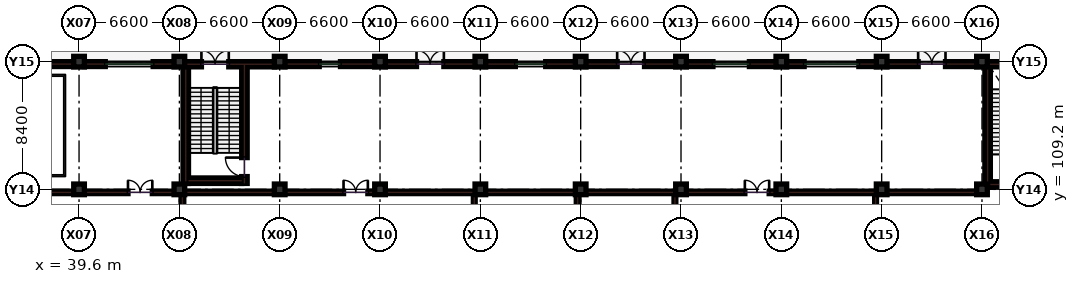
"""IFC4 building model, lengths in metres.
Left out: names, types, materials, properties, quantities, classifications, styles, units other than length and angle.
Written with IfcOpenShell. Run it as: python <this file> out.ifc"""

import sys

from ifc_helpers import new_model, si_unit, direction, frame, frame_2d, origin, origin_2d, place, context, subcontext, project, spatial, rectangle, extrude, element, fill, save


model = new_model("IFC4")
c1 = context("Model", 3, precision=1e-05, world=origin(), true_north=direction((0.0, 1.0)))
c2 = subcontext(c1, "Body", "Model", "MODEL_VIEW")
j1 = project(units=[si_unit("LENGTHUNIT", "METRE"), si_unit("PLANEANGLEUNIT", "RADIAN")], contexts=[c1])
p1 = place(None, origin())
s1 = spatial("IfcSite", under=j1, at=p1, CompositionType="ELEMENT")
p2 = place(p1, origin())
s2 = spatial("IfcBuilding", under=s1, at=p2, CompositionType="ELEMENT")
p3 = place(p2, origin())
s3 = spatial("IfcBuildingStorey", under=s2, at=p3, CompositionType="ELEMENT", Elevation=0.0)
for number, where, z_axis, x_axis in (
    (1, (39.6, 109.2, 0.0), (0.0, 0.0, 1.0), (1.0, 0.0, 0.0)),
    (2, (39.6, 117.6, 0.0), (0.0, 0.0, 1.0), (1.0, 0.0, 0.0)),
    (3, (46.2, 109.2, 0.0), (0.0, 0.0, 1.0), (1.0, 0.0, 0.0)),
    (4, (46.2, 117.6, 0.0), (0.0, 0.0, 1.0), (1.0, 0.0, 0.0)),
    (5, (52.8, 109.2, 0.0), (0.0, 0.0, 1.0), (1.0, 0.0, 0.0)),
    (6, (52.8, 117.6, 0.0), (0.0, 0.0, 1.0), (1.0, 0.0, 0.0)),
    (7, (59.4, 109.2, 0.0), (0.0, 0.0, 1.0), (1.0, 0.0, 0.0)),
    (8, (59.4, 117.6, 0.0), (0.0, 0.0, 1.0), (1.0, 0.0, 0.0)),
    (9, (66.0, 109.2, 0.0), (0.0, 0.0, 1.0), (1.0, 0.0, 0.0)),
    (10, (66.0, 117.6, 0.0), (0.0, 0.0, 1.0), (1.0, 0.0, 0.0)),
    (11, (72.6, 109.2, 0.0), (0.0, 0.0, 1.0), (1.0, 0.0, 0.0)),
    (12, (72.6, 117.6, 0.0), (0.0, 0.0, 1.0), (1.0, 0.0, 0.0)),
    (13, (79.2, 109.2, 0.0), (0.0, 0.0, 1.0), (1.0, 0.0, 0.0)),
    (14, (79.2, 117.6, 0.0), (0.0, 0.0, 1.0), (1.0, 0.0, 0.0)),
    (15, (85.8, 109.2, 0.0), (0.0, 0.0, 1.0), (1.0, 0.0, 0.0)),
    (16, (85.8, 117.6, 0.0), (0.0, 0.0, 1.0), (1.0, 0.0, 0.0)),
    (17, (92.4, 109.2, 0.0), (0.0, 0.0, 1.0), (1.0, 0.0, 0.0)),
    (18, (92.4, 117.6, 0.0), (0.0, 0.0, 1.0), (1.0, 0.0, 0.0)),
    (19, (99.0, 109.2, 0.0), (0.0, 0.0, 1.0), (1.0, 0.0, 0.0)),
    (20, (99.0, 117.6, 0.0), (0.0, 0.0, 1.0), (1.0, 0.0, 0.0)),
):
    element("IfcColumn", number, at=place(p3, frame(where, z_axis=z_axis, x_axis=x_axis)), inside=s3, PredefinedType="COLUMN", context=c2, shape_type="SweptSolid", body=[
        extrude(rectangle(XDim=0.7, YDim=0.7, at=origin_2d()), origin(), (0.0, 0.0, 1.0), 5.4),
    ])
p4 = place(p3, frame((33.32, 109.0, 0.0), z_axis=(0.0, 0.0, 1.0), x_axis=(1.0, 0.0, 0.0)))
e21 = element("IfcWall", 21, at=p4, inside=s3, PredefinedType="PARTITIONING", context=c2, shape_type="SweptSolid", body=[
    extrude(rectangle(XDim=5.83, YDim=0.16, at=frame_2d((2.915, 0.0))), origin(), (0.0, 0.0, 1.0), 4.235),
])
p5 = place(p3, frame((40.05, 109.0, 0.0), z_axis=(0.0, 0.0, 1.0), x_axis=(1.0, 0.0, 0.0)))
e22 = element("IfcWall", 22, at=p5, inside=s3, PredefinedType="PARTITIONING", context=c2, shape_type="SweptSolid", body=[
    extrude(rectangle(XDim=5.7, YDim=0.16, at=frame_2d((2.85, 0.0))), origin(), (0.0, 0.0, 1.0), 4.235),
])
p6 = place(p5, frame((2.77, 0.0, 0.0)))
e23 = element("IfcOpeningElement", 23, at=p6, cuts=e22, PredefinedType="OPENING", context=c2, shape_type="SweptSolid", body=[
    extrude(rectangle(XDim=1.6, YDim=2.2, at=frame_2d((0.8, 1.1))), frame((0.0, 0.09, 0.0), z_axis=(0.0, -1.0, 0.0), x_axis=(1.0, 0.0, 0.0)), (0.0, 0.0, 1.0), 0.18),
])
p7 = place(p3, frame((46.65, 109.0, 0.0), z_axis=(0.0, 0.0, 1.0), x_axis=(1.0, 0.0, 0.0)))
e24 = element("IfcWall", 24, at=p7, inside=s3, PredefinedType="PARTITIONING", context=c2, shape_type="SweptSolid", body=[
    extrude(rectangle(XDim=5.7, YDim=0.16, at=frame_2d((2.85, 0.0))), origin(), (0.0, 0.0, 1.0), 4.235),
])
p8 = place(p3, frame((53.25, 109.0, 0.0), z_axis=(0.0, 0.0, 1.0), x_axis=(1.0, 0.0, 0.0)))
e25 = element("IfcWall", 25, at=p8, inside=s3, PredefinedType="PARTITIONING", context=c2, shape_type="SweptSolid", body=[
    extrude(rectangle(XDim=5.7, YDim=0.16, at=frame_2d((2.85, 0.0))), origin(), (0.0, 0.0, 1.0), 4.235),
])
p9 = place(p8, frame((3.75, 0.0, 0.0)))
e26 = element("IfcOpeningElement", 26, at=p9, cuts=e25, PredefinedType="OPENING", context=c2, shape_type="SweptSolid", body=[
    extrude(rectangle(XDim=1.6, YDim=2.2, at=frame_2d((0.8, 1.1))), frame((0.0, 0.09, 0.0), z_axis=(0.0, -1.0, 0.0), x_axis=(1.0, 0.0, 0.0)), (0.0, 0.0, 1.0), 0.18),
])
for number, where, z_axis, x_axis in (
    (27, (59.85, 109.0, 0.0), (0.0, 0.0, 1.0), (1.0, 0.0, 0.0)),
    (28, (66.45, 109.0, 0.0), (0.0, 0.0, 1.0), (1.0, 0.0, 0.0)),
    (29, (73.05, 109.0, 0.0), (0.0, 0.0, 1.0), (1.0, 0.0, 0.0)),
):
    element("IfcWall", number, at=place(p3, frame(where, z_axis=z_axis, x_axis=x_axis)), inside=s3, PredefinedType="PARTITIONING", context=c2, shape_type="SweptSolid", body=[
        extrude(rectangle(XDim=5.7, YDim=0.16, at=frame_2d((2.85, 0.0))), origin(), (0.0, 0.0, 1.0), 4.235),
    ])
p10 = place(p3, frame((79.65, 109.0, 0.0), z_axis=(0.0, 0.0, 1.0), x_axis=(1.0, 0.0, 0.0)))
e30 = element("IfcWall", 30, at=p10, inside=s3, PredefinedType="PARTITIONING", context=c2, shape_type="SweptSolid", body=[
    extrude(rectangle(XDim=5.7, YDim=0.16, at=frame_2d((2.85, 0.0))), origin(), (0.0, 0.0, 1.0), 4.235),
])
p11 = place(p10, frame((3.75, 0.0, 0.0)))
e31 = element("IfcOpeningElement", 31, at=p11, cuts=e30, PredefinedType="OPENING", context=c2, shape_type="SweptSolid", body=[
    extrude(rectangle(XDim=1.6, YDim=2.2, at=frame_2d((0.8, 1.1))), frame((0.0, 0.09, 0.0), z_axis=(0.0, -1.0, 0.0), x_axis=(1.0, 0.0, 0.0)), (0.0, 0.0, 1.0), 0.18),
])
p12 = place(p3, frame((86.25, 109.0, 0.0), z_axis=(0.0, 0.0, 1.0), x_axis=(1.0, 0.0, 0.0)))
e32 = element("IfcWall", 32, at=p12, inside=s3, PredefinedType="PARTITIONING", context=c2, shape_type="SweptSolid", body=[
    extrude(rectangle(XDim=5.7, YDim=0.16, at=frame_2d((2.85, 0.0))), origin(), (0.0, 0.0, 1.0), 4.235),
])
p13 = place(p3, frame((92.85, 109.0, 0.0), z_axis=(0.0, 0.0, 1.0), x_axis=(1.0, 0.0, 0.0)))
e33 = element("IfcWall", 33, at=p13, inside=s3, PredefinedType="PARTITIONING", context=c2, shape_type="SweptSolid", body=[
    extrude(rectangle(XDim=6.45, YDim=0.16, at=frame_2d((3.225, 0.0))), origin(), (0.0, 0.0, 1.0), 4.235),
])
for number, where, z_axis, x_axis in (
    (34, (46.4, 101.25, 0.0), (0.0, 0.0, 1.0), (0.0, 1.0, 0.0)),
    (35, (72.4, 101.25, 0.0), (0.0, 0.0, 1.0), (0.0, 1.0, 0.0)),
):
    element("IfcWall", number, at=place(p3, frame(where, z_axis=z_axis, x_axis=x_axis)), inside=s3, PredefinedType="SOLIDWALL", context=c2, shape_type="SweptSolid", body=[
        extrude(rectangle(XDim=7.75, YDim=0.18, at=frame_2d((3.875, 0.0))), origin(), (0.0, 0.0, 1.0), 4.25),
    ])
p14 = place(p3, frame((65.6, 101.0, 0.0), z_axis=(0.0, 0.0, 1.0), x_axis=(0.0, 1.0, 0.0)))
e36 = element("IfcWall", 36, at=p14, inside=s3, PredefinedType="PARTITIONING", context=c2, shape_type="SweptSolid", body=[
    extrude(rectangle(XDim=8.0, YDim=0.12, at=frame_2d((4.0, 0.0))), origin(), (0.0, 0.0, 1.0), 4.25),
])
p15 = place(p14, frame((3.8, 0.0, 0.0)))
e37 = element("IfcOpeningElement", 37, at=p15, cuts=e36, PredefinedType="OPENING", context=c2, shape_type="SweptSolid", body=[
    extrude(rectangle(XDim=1.0, YDim=2.2, at=frame_2d((0.5, 1.1))), frame((0.0, 0.07, 0.0), z_axis=(0.0, -1.0, 0.0), x_axis=(1.0, 0.0, 0.0)), (0.0, 0.0, 1.0), 0.14),
])
p16 = place(p3, frame((78.8, 101.0, 0.0), z_axis=(0.0, 0.0, 1.0), x_axis=(0.0, 1.0, 0.0)))
e38 = element("IfcWall", 38, at=p16, inside=s3, PredefinedType="PARTITIONING", context=c2, shape_type="SweptSolid", body=[
    extrude(rectangle(XDim=8.0, YDim=0.12, at=frame_2d((4.0, 0.0))), origin(), (0.0, 0.0, 1.0), 4.25),
])
p17 = place(p16, frame((3.8, 0.0, 0.0)))
e39 = element("IfcOpeningElement", 39, at=p17, cuts=e38, PredefinedType="OPENING", context=c2, shape_type="SweptSolid", body=[
    extrude(rectangle(XDim=1.15, YDim=2.2, at=frame_2d((0.575, 1.1))), frame((0.0, 0.07, 0.0), z_axis=(0.0, -1.0, 0.0), x_axis=(1.0, 0.0, 0.0)), (0.0, 0.0, 1.0), 0.14),
])
p18 = place(p3, frame((92.0, 101.0, 0.0), z_axis=(0.0, 0.0, 1.0), x_axis=(0.0, 1.0, 0.0)))
e40 = element("IfcWall", 40, at=p18, inside=s3, PredefinedType="PARTITIONING", context=c2, shape_type="SweptSolid", body=[
    extrude(rectangle(XDim=8.0, YDim=0.12, at=frame_2d((4.0, 0.0))), origin(), (0.0, 0.0, 1.0), 4.25),
])
p19 = place(p18, frame((3.8, 0.0, 0.0)))
e41 = element("IfcOpeningElement", 41, at=p19, cuts=e40, PredefinedType="OPENING", context=c2, shape_type="SweptSolid", body=[
    extrude(rectangle(XDim=1.45, YDim=2.25, at=frame_2d((0.725, 1.125))), frame((0.0, 0.07, 0.0), z_axis=(0.0, -1.0, 0.0), x_axis=(1.0, 0.0, 0.0)), (0.0, 0.0, 1.0), 0.14),
])
p20 = place(p3, frame((39.255, 117.44, 0.0), z_axis=(0.0, 0.0, 1.0), x_axis=(-1.0, 0.0, 0.0)))
e42 = element("IfcWall", 42, at=p20, inside=s3, PredefinedType="SOLIDWALL", context=c2, shape_type="SweptSolid", body=[
    extrude(rectangle(XDim=5.96, YDim=0.32, at=frame_2d((2.98, 0.0))), origin(), (0.0, 0.0, 1.0), 4.385),
])
p21 = place(p20, frame((1.555, 0.0, 0.95)))
e43 = element("IfcOpeningElement", 43, at=p21, cuts=e42, PredefinedType="OPENING", context=c2, shape_type="SweptSolid", body=[
    extrude(rectangle(XDim=2.85, YDim=1.65, at=frame_2d((1.425, 0.825))), frame((0.0, 0.17, 0.0), z_axis=(0.0, -1.0, 0.0), x_axis=(1.0, 0.0, 0.0)), (0.0, 0.0, 1.0), 0.34),
])
p22 = place(p3, frame((45.855, 117.44, 0.0), z_axis=(0.0, 0.0, 1.0), x_axis=(-1.0, 0.0, 0.0)))
e44 = element("IfcWall", 44, at=p22, inside=s3, PredefinedType="SOLIDWALL", context=c2, shape_type="SweptSolid", body=[
    extrude(rectangle(XDim=5.91, YDim=0.32, at=frame_2d((2.955, 0.0))), origin(), (0.0, 0.0, 1.0), 4.385),
])
p23 = place(p22, frame((1.38, 0.0, 0.95)))
e45 = element("IfcOpeningElement", 45, at=p23, cuts=e44, PredefinedType="OPENING", context=c2, shape_type="SweptSolid", body=[
    extrude(rectangle(XDim=3.15, YDim=1.7, at=frame_2d((1.575, 0.85))), frame((0.0, 0.17, 0.0), z_axis=(0.0, -1.0, 0.0), x_axis=(1.0, 0.0, 0.0)), (0.0, 0.0, 1.0), 0.34),
])
p24 = place(p3, frame((52.455, 117.43, 0.0), z_axis=(0.0, 0.0, 1.0), x_axis=(-1.0, 0.0, 0.0)))
e46 = element("IfcWall", 46, at=p24, inside=s3, PredefinedType="SHEAR", context=c2, shape_type="SweptSolid", body=[
    extrude(rectangle(XDim=5.91, YDim=0.34, at=frame_2d((2.955, 0.0))), origin(), (0.0, 0.0, 1.0), 5.1),
])
p25 = place(p24, frame((3.005, 0.0, 0.0)))
e47 = element("IfcOpeningElement", 47, at=p25, cuts=e46, PredefinedType="OPENING", context=c2, shape_type="SweptSolid", body=[
    extrude(rectangle(XDim=1.8, YDim=2.2, at=frame_2d((0.9, 1.1))), frame((0.0, 0.18, 0.0), z_axis=(0.0, -1.0, 0.0), x_axis=(1.0, 0.0, 0.0)), (0.0, 0.0, 1.0), 0.36),
])
p26 = place(p3, frame((59.055, 117.44, 0.0), z_axis=(0.0, 0.0, 1.0), x_axis=(-1.0, 0.0, 0.0)))
e48 = element("IfcWall", 48, at=p26, inside=s3, PredefinedType="SOLIDWALL", context=c2, shape_type="SweptSolid", body=[
    extrude(rectangle(XDim=5.91, YDim=0.32, at=frame_2d((2.955, 0.0))), origin(), (0.0, 0.0, 1.0), 4.385),
])
p27 = place(p26, frame((2.255, 0.0, 0.95)))
e49 = element("IfcOpeningElement", 49, at=p27, cuts=e48, PredefinedType="OPENING", context=c2, shape_type="SweptSolid", body=[
    extrude(rectangle(XDim=1.4, YDim=1.95, at=frame_2d((0.7, 0.975))), frame((0.0, 0.17, 0.0), z_axis=(0.0, -1.0, 0.0), x_axis=(1.0, 0.0, 0.0)), (0.0, 0.0, 1.0), 0.34),
])
p28 = place(p3, frame((65.655, 117.44, 0.0), z_axis=(0.0, 0.0, 1.0), x_axis=(-1.0, 0.0, 0.0)))
e50 = element("IfcWall", 50, at=p28, inside=s3, PredefinedType="SOLIDWALL", context=c2, shape_type="SweptSolid", body=[
    extrude(rectangle(XDim=5.91, YDim=0.32, at=frame_2d((2.955, 0.0))), origin(), (0.0, 0.0, 1.0), 4.385),
])
p29 = place(p28, frame((2.055, 0.0, 0.0)))
e51 = element("IfcOpeningElement", 51, at=p29, cuts=e50, PredefinedType="OPENING", context=c2, shape_type="SweptSolid", body=[
    extrude(rectangle(XDim=1.8, YDim=2.2, at=frame_2d((0.9, 1.1))), frame((0.0, 0.17, 0.0), z_axis=(0.0, -1.0, 0.0), x_axis=(1.0, 0.0, 0.0)), (0.0, 0.0, 1.0), 0.34),
])
p30 = place(p3, frame((72.255, 117.44, 0.0), z_axis=(0.0, 0.0, 1.0), x_axis=(-1.0, 0.0, 0.0)))
e52 = element("IfcWall", 52, at=p30, inside=s3, PredefinedType="SOLIDWALL", context=c2, shape_type="SweptSolid", body=[
    extrude(rectangle(XDim=5.91, YDim=0.32, at=frame_2d((2.955, 0.0))), origin(), (0.0, 0.0, 1.0), 4.385),
])
p31 = place(p30, frame((1.955, 0.0, 0.95)))
e53 = element("IfcOpeningElement", 53, at=p31, cuts=e52, PredefinedType="OPENING", context=c2, shape_type="SweptSolid", body=[
    extrude(rectangle(XDim=2.0, YDim=1.95, at=frame_2d((1.0, 0.975))), frame((0.0, 0.17, 0.0), z_axis=(0.0, -1.0, 0.0), x_axis=(1.0, 0.0, 0.0)), (0.0, 0.0, 1.0), 0.34),
])
p32 = place(p3, frame((78.855, 117.44, 0.0), z_axis=(0.0, 0.0, 1.0), x_axis=(-1.0, 0.0, 0.0)))
e54 = element("IfcWall", 54, at=p32, inside=s3, PredefinedType="SOLIDWALL", context=c2, shape_type="SweptSolid", body=[
    extrude(rectangle(XDim=5.91, YDim=0.32, at=frame_2d((2.955, 0.0))), origin(), (0.0, 0.0, 1.0), 4.385),
])
p33 = place(p32, frame((2.055, 0.0, 0.0)))
e55 = element("IfcOpeningElement", 55, at=p33, cuts=e54, PredefinedType="OPENING", context=c2, shape_type="SweptSolid", body=[
    extrude(rectangle(XDim=1.8, YDim=2.2, at=frame_2d((0.9, 1.1))), frame((0.0, 0.17, 0.0), z_axis=(0.0, -1.0, 0.0), x_axis=(1.0, 0.0, 0.0)), (0.0, 0.0, 1.0), 0.34),
])
p34 = place(p3, frame((85.455, 117.44, 0.0), z_axis=(0.0, 0.0, 1.0), x_axis=(-1.0, 0.0, 0.0)))
e56 = element("IfcWall", 56, at=p34, inside=s3, PredefinedType="SOLIDWALL", context=c2, shape_type="SweptSolid", body=[
    extrude(rectangle(XDim=5.91, YDim=0.32, at=frame_2d((2.955, 0.0))), origin(), (0.0, 0.0, 1.0), 4.385),
])
p35 = place(p34, frame((1.755, 0.0, 0.95)))
e57 = element("IfcOpeningElement", 57, at=p35, cuts=e56, PredefinedType="OPENING", context=c2, shape_type="SweptSolid", body=[
    extrude(rectangle(XDim=2.4, YDim=1.6, at=frame_2d((1.2, 0.8))), frame((0.0, 0.17, 0.0), z_axis=(0.0, -1.0, 0.0), x_axis=(1.0, 0.0, 0.0)), (0.0, 0.0, 1.0), 0.34),
])
p36 = place(p3, frame((92.055, 117.44, 0.0), z_axis=(0.0, 0.0, 1.0), x_axis=(-1.0, 0.0, 0.0)))
e58 = element("IfcWall", 58, at=p36, inside=s3, PredefinedType="SOLIDWALL", context=c2, shape_type="SweptSolid", body=[
    extrude(rectangle(XDim=5.91, YDim=0.32, at=frame_2d((2.955, 0.0))), origin(), (0.0, 0.0, 1.0), 4.385),
])
p37 = place(p36, frame((1.155, 0.0, 0.95)))
e59 = element("IfcOpeningElement", 59, at=p37, cuts=e58, PredefinedType="OPENING", context=c2, shape_type="SweptSolid", body=[
    extrude(rectangle(XDim=3.6, YDim=2.0, at=frame_2d((1.8, 1.0))), frame((0.0, 0.17, 0.0), z_axis=(0.0, -1.0, 0.0), x_axis=(1.0, 0.0, 0.0)), (0.0, 0.0, 1.0), 0.34),
])
p38 = place(p3, frame((98.655, 117.44, 0.0), z_axis=(0.0, 0.0, 1.0), x_axis=(-1.0, 0.0, 0.0)))
e60 = element("IfcWall", 60, at=p38, inside=s3, PredefinedType="SOLIDWALL", context=c2, shape_type="SweptSolid", body=[
    extrude(rectangle(XDim=5.91, YDim=0.32, at=frame_2d((2.955, 0.0))), origin(), (0.0, 0.0, 1.0), 4.385),
])
p39 = place(p38, frame((2.055, 0.0, 0.0)))
e61 = element("IfcOpeningElement", 61, at=p39, cuts=e60, PredefinedType="OPENING", context=c2, shape_type="SweptSolid", body=[
    extrude(rectangle(XDim=1.8, YDim=2.2, at=frame_2d((0.9, 1.1))), frame((0.0, 0.17, 0.0), z_axis=(0.0, -1.0, 0.0), x_axis=(1.0, 0.0, 0.0)), (0.0, 0.0, 1.0), 0.34),
])
p40 = place(p3, frame((105.255, 117.43, 0.0), z_axis=(0.0, 0.0, 1.0), x_axis=(-1.0, 0.0, 0.0)))
e62 = element("IfcWall", 62, at=p40, inside=s3, PredefinedType="SHEAR", context=c2, shape_type="SweptSolid", body=[
    extrude(rectangle(XDim=5.91, YDim=0.34, at=frame_2d((2.955, 0.0))), origin(), (0.0, 0.0, 1.0), 5.1),
])
p41 = place(p3, frame((99.37, 109.34, 0.0), z_axis=(0.0, 0.0, 1.0), x_axis=(0.0, 1.0, 0.0)))
e63 = element("IfcWall", 63, at=p41, inside=s3, PredefinedType="SHEAR", context=c2, shape_type="SweptSolid", body=[
    extrude(rectangle(XDim=8.09, YDim=0.36, at=frame_2d((4.045, 0.0))), origin(), (0.0, 0.0, 1.0), 5.1),
])
p42 = place(p3, frame((99.55, 109.52, 0.0), z_axis=(0.0, 0.0, 1.0), x_axis=(1.0, 0.0, 0.0)))
e64 = element("IfcWall", 64, at=p42, inside=s3, PredefinedType="SHEAR", context=c2, shape_type="SweptSolid", body=[
    extrude(rectangle(XDim=3.8, YDim=0.36, at=frame_2d((1.9, 0.0))), origin(), (0.0, 0.0, 1.0), 5.1),
])
p43 = place(p3, frame((46.62, 109.59, 0.0), z_axis=(0.0, 0.0, 1.0), x_axis=(0.0, 1.0, 0.0)))
e65 = element("IfcWall", 65, at=p43, inside=s3, PredefinedType="SHEAR", context=c2, shape_type="SweptSolid", body=[
    extrude(rectangle(XDim=7.84, YDim=0.36, at=frame_2d((3.92, 0.0))), origin(), (0.0, 0.0, 1.0), 5.1),
])
p44 = place(p3, frame((50.48, 109.59, 0.0), z_axis=(0.0, 0.0, 1.0), x_axis=(0.0, 1.0, 0.0)))
e66 = element("IfcWall", 66, at=p44, inside=s3, PredefinedType="SHEAR", context=c2, shape_type="SweptSolid", body=[
    extrude(rectangle(XDim=7.84, YDim=0.36, at=frame_2d((3.92, 0.0))), origin(), (0.0, 0.0, 1.0), 5.1),
])
p45 = place(p44, frame((0.45, 0.0, 0.0)))
e67 = element("IfcOpeningElement", 67, at=p45, cuts=e66, PredefinedType="OPENING", context=c2, shape_type="SweptSolid", body=[
    extrude(rectangle(XDim=1.25, YDim=2.15, at=frame_2d((0.625, 1.075))), frame((0.0, 0.19, 0.0), z_axis=(0.0, -1.0, 0.0), x_axis=(1.0, 0.0, 0.0)), (0.0, 0.0, 1.0), 0.38),
])
p46 = place(p3, frame((46.8, 109.77, 0.0), z_axis=(0.0, 0.0, 1.0), x_axis=(1.0, 0.0, 0.0)))
e68 = element("IfcWall", 68, at=p46, inside=s3, PredefinedType="SHEAR", context=c2, shape_type="SweptSolid", body=[
    extrude(rectangle(XDim=3.5, YDim=0.36, at=frame_2d((1.75, 0.0))), origin(), (0.0, 0.0, 1.0), 5.1),
])
p47 = place(p6, origin())
e69 = element("IfcDoor", 69, at=p47, inside=s3, OperationType="DOUBLE_DOOR_SINGLE_SWING", PredefinedType="DOOR", context=c2, shape_type="SweptSolid", body=[
    extrude(rectangle(XDim=1.6, YDim=2.2, at=frame_2d((0.8, 1.1))), frame((0.0, 0.025, 0.0), z_axis=(0.0, -1.0, 0.0), x_axis=(1.0, 0.0, 0.0)), (0.0, 0.0, 1.0), 0.05),
])
fill(e23, e69)
p48 = place(p9, origin())
e70 = element("IfcDoor", 70, at=p48, inside=s3, OperationType="DOUBLE_DOOR_SINGLE_SWING", PredefinedType="DOOR", context=c2, shape_type="SweptSolid", body=[
    extrude(rectangle(XDim=1.6, YDim=2.2, at=frame_2d((0.8, 1.1))), frame((0.0, 0.025, 0.0), z_axis=(0.0, -1.0, 0.0), x_axis=(1.0, 0.0, 0.0)), (0.0, 0.0, 1.0), 0.05),
])
fill(e26, e70)
p49 = place(p11, origin())
e71 = element("IfcDoor", 71, at=p49, inside=s3, OperationType="DOUBLE_DOOR_SINGLE_SWING", PredefinedType="DOOR", context=c2, shape_type="SweptSolid", body=[
    extrude(rectangle(XDim=1.6, YDim=2.2, at=frame_2d((0.8, 1.1))), frame((0.0, 0.025, 0.0), z_axis=(0.0, -1.0, 0.0), x_axis=(1.0, 0.0, 0.0)), (0.0, 0.0, 1.0), 0.05),
])
fill(e31, e71)
p50 = place(p23, origin())
e72 = element("IfcWindow", 72, at=p50, inside=s3, PartitioningType="SINGLE_PANEL", PredefinedType="WINDOW", context=c2, shape_type="SweptSolid", body=[
    extrude(rectangle(XDim=3.15, YDim=1.7, at=frame_2d((1.575, 0.85))), frame((0.0, 0.03, 0.0), z_axis=(0.0, -1.0, 0.0), x_axis=(1.0, 0.0, 0.0)), (0.0, 0.0, 1.0), 0.06),
])
fill(e45, e72)
p51 = place(p25, frame((1.8, 0.0, 0.0), z_axis=(0.0, 0.0, 1.0), x_axis=(-1.0, 0.0, 0.0)))
e73 = element("IfcDoor", 73, at=p51, inside=s3, OperationType="DOUBLE_DOOR_SINGLE_SWING", PredefinedType="DOOR", context=c2, shape_type="SweptSolid", body=[
    extrude(rectangle(XDim=1.8, YDim=2.2, at=frame_2d((0.9, 1.1))), frame((0.0, 0.025, 0.0), z_axis=(0.0, -1.0, 0.0), x_axis=(1.0, 0.0, 0.0)), (0.0, 0.0, 1.0), 0.05),
])
fill(e47, e73)
p52 = place(p27, origin())
e74 = element("IfcWindow", 74, at=p52, inside=s3, PartitioningType="SINGLE_PANEL", PredefinedType="WINDOW", context=c2, shape_type="SweptSolid", body=[
    extrude(rectangle(XDim=1.4, YDim=1.95, at=frame_2d((0.7, 0.975))), frame((0.0, 0.03, 0.0), z_axis=(0.0, -1.0, 0.0), x_axis=(1.0, 0.0, 0.0)), (0.0, 0.0, 1.0), 0.06),
])
fill(e49, e74)
p53 = place(p29, frame((1.8, 0.0, 0.0), z_axis=(0.0, 0.0, 1.0), x_axis=(-1.0, 0.0, 0.0)))
e75 = element("IfcDoor", 75, at=p53, inside=s3, OperationType="DOUBLE_DOOR_SINGLE_SWING", PredefinedType="DOOR", context=c2, shape_type="SweptSolid", body=[
    extrude(rectangle(XDim=1.8, YDim=2.2, at=frame_2d((0.9, 1.1))), frame((0.0, 0.025, 0.0), z_axis=(0.0, -1.0, 0.0), x_axis=(1.0, 0.0, 0.0)), (0.0, 0.0, 1.0), 0.05),
])
fill(e51, e75)
p54 = place(p31, origin())
e76 = element("IfcWindow", 76, at=p54, inside=s3, PartitioningType="SINGLE_PANEL", PredefinedType="WINDOW", context=c2, shape_type="SweptSolid", body=[
    extrude(rectangle(XDim=2.0, YDim=1.95, at=frame_2d((1.0, 0.975))), frame((0.0, 0.03, 0.0), z_axis=(0.0, -1.0, 0.0), x_axis=(1.0, 0.0, 0.0)), (0.0, 0.0, 1.0), 0.06),
])
fill(e53, e76)
p55 = place(p33, frame((1.8, 0.0, 0.0), z_axis=(0.0, 0.0, 1.0), x_axis=(-1.0, 0.0, 0.0)))
e77 = element("IfcDoor", 77, at=p55, inside=s3, OperationType="DOUBLE_DOOR_SINGLE_SWING", PredefinedType="DOOR", context=c2, shape_type="SweptSolid", body=[
    extrude(rectangle(XDim=1.8, YDim=2.2, at=frame_2d((0.9, 1.1))), frame((0.0, 0.025, 0.0), z_axis=(0.0, -1.0, 0.0), x_axis=(1.0, 0.0, 0.0)), (0.0, 0.0, 1.0), 0.05),
])
fill(e55, e77)
p56 = place(p35, origin())
e78 = element("IfcWindow", 78, at=p56, inside=s3, PartitioningType="SINGLE_PANEL", PredefinedType="WINDOW", context=c2, shape_type="SweptSolid", body=[
    extrude(rectangle(XDim=2.4, YDim=1.6, at=frame_2d((1.2, 0.8))), frame((0.0, 0.03, 0.0), z_axis=(0.0, -1.0, 0.0), x_axis=(1.0, 0.0, 0.0)), (0.0, 0.0, 1.0), 0.06),
])
fill(e57, e78)
p57 = place(p37, origin())
e79 = element("IfcWindow", 79, at=p57, inside=s3, PartitioningType="SINGLE_PANEL", PredefinedType="WINDOW", context=c2, shape_type="SweptSolid", body=[
    extrude(rectangle(XDim=3.6, YDim=2.0, at=frame_2d((1.8, 1.0))), frame((0.0, 0.03, 0.0), z_axis=(0.0, -1.0, 0.0), x_axis=(1.0, 0.0, 0.0)), (0.0, 0.0, 1.0), 0.06),
])
fill(e59, e79)
p58 = place(p39, frame((1.8, 0.0, 0.0), z_axis=(0.0, 0.0, 1.0), x_axis=(-1.0, 0.0, 0.0)))
e80 = element("IfcDoor", 80, at=p58, inside=s3, OperationType="DOUBLE_DOOR_SINGLE_SWING", PredefinedType="DOOR", context=c2, shape_type="SweptSolid", body=[
    extrude(rectangle(XDim=1.8, YDim=2.2, at=frame_2d((0.9, 1.1))), frame((0.0, 0.025, 0.0), z_axis=(0.0, -1.0, 0.0), x_axis=(1.0, 0.0, 0.0)), (0.0, 0.0, 1.0), 0.05),
])
fill(e61, e80)
p59 = place(p45, origin())
e81 = element("IfcDoor", 81, at=p59, inside=s3, OperationType="SINGLE_SWING_RIGHT", PredefinedType="DOOR", context=c2, shape_type="SweptSolid", body=[
    extrude(rectangle(XDim=1.25, YDim=2.15, at=frame_2d((0.625, 1.075))), frame((0.0, 0.025, 0.0), z_axis=(0.0, -1.0, 0.0), x_axis=(1.0, 0.0, 0.0)), (0.0, 0.0, 1.0), 0.05),
])
fill(e67, e81)
save(model, sys.argv[1])
